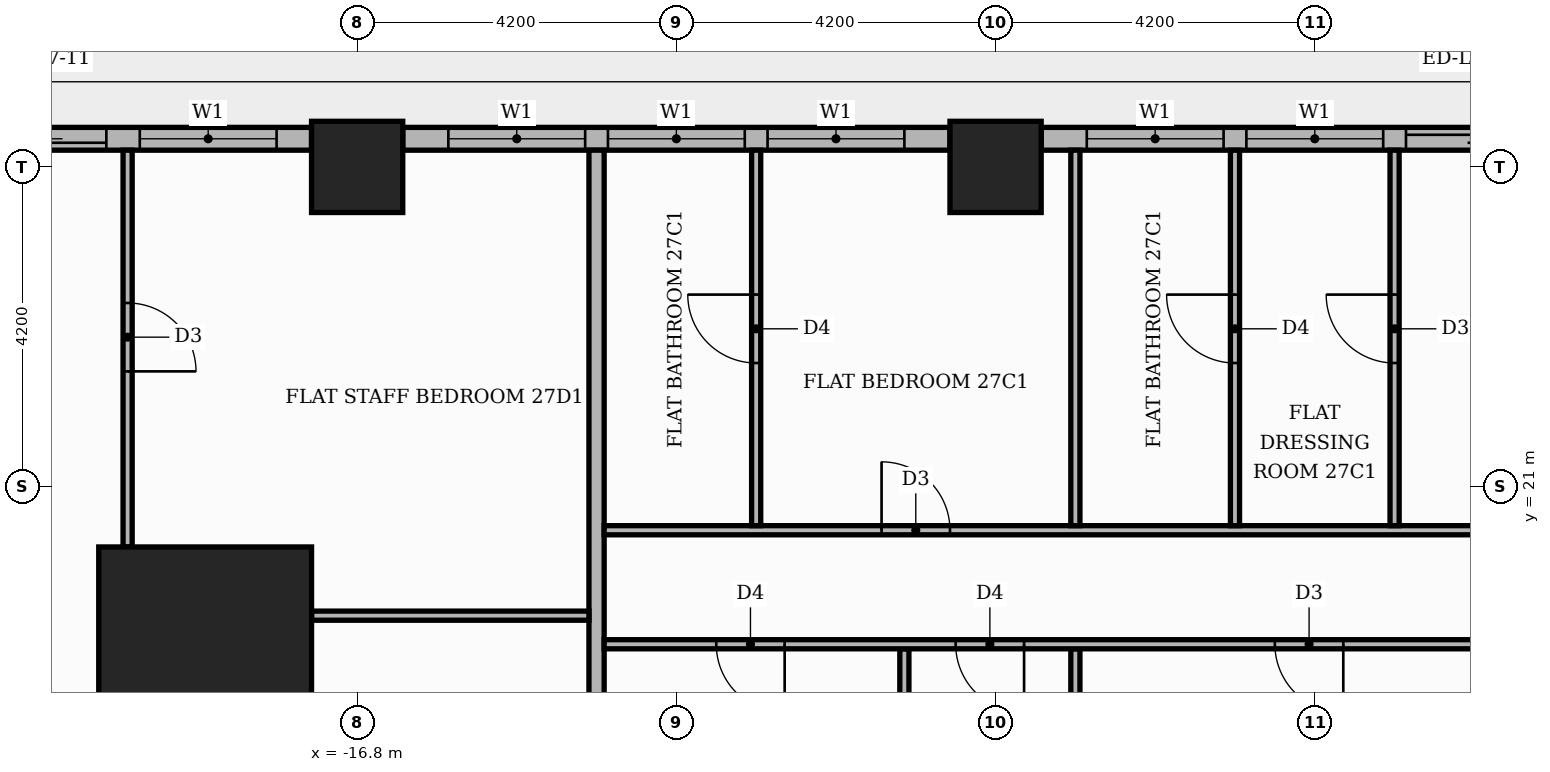
"""IFC4 building model, lengths in metres.
Left out: names, types, materials, properties, quantities, classifications, styles, units other than length and angle.
Written with IfcOpenShell. Run it as: python <this file> out.ifc"""

import sys

from ifc_helpers import new_model, si_unit, direction, frame, frame_2d, origin, origin_2d, place, context, subcontext, project, spatial, rectangle, extrude, element, fill, save


model = new_model("IFC4")
c1 = context("Model", 3, precision=1e-05, world=origin(), true_north=direction((0.0, 1.0)))
c2 = subcontext(c1, "Body", "Model", "MODEL_VIEW")
j1 = project(units=[si_unit("LENGTHUNIT", "METRE"), si_unit("PLANEANGLEUNIT", "RADIAN")], contexts=[c1])
p1 = place(None, origin())
s1 = spatial("IfcSite", under=j1, at=p1, CompositionType="ELEMENT")
p2 = place(p1, origin())
s2 = spatial("IfcBuilding", under=s1, at=p2, CompositionType="ELEMENT")
p3 = place(p2, frame((0.0, 0.0, 114.3)))
s3 = spatial("IfcBuildingStorey", under=s2, at=p3, CompositionType="ELEMENT", Elevation=114.3)
p4 = place(p3, frame((-18.8, 18.8, 0.0), z_axis=(0.0, 0.0, 1.0), x_axis=(1.0, 0.0, 0.0)))
e1 = element("IfcColumn", 1, at=p4, inside=s3, PredefinedType="COLUMN", context=c2, shape_type="SweptSolid", body=[
    extrude(rectangle(XDim=2.8, YDim=2.8, at=origin_2d()), origin(), (0.0, 0.0, 1.0), 3.9),
])
for number, where, z_axis, x_axis in (
    (2, (-8.4, 25.2, 0.0), (0.0, 0.0, 1.0), (1.0, 0.0, 0.0)),
    (3, (-16.8, 25.2, 0.0), (0.0, 0.0, 1.0), (1.0, 0.0, 0.0)),
):
    element("IfcColumn", number, at=place(p3, frame(where, z_axis=z_axis, x_axis=x_axis)), inside=s3, PredefinedType="COLUMN", context=c2, shape_type="SweptSolid", body=[
        extrude(rectangle(XDim=1.2, YDim=1.2, at=origin_2d()), origin(), (0.0, 0.0, 1.0), 3.9),
    ])
p5 = place(p3, frame((-0.6, 25.57, 0.0), z_axis=(0.0, 0.0, 1.0), x_axis=(-1.0, 0.0, 0.0)))
e4 = element("IfcWall", 4, at=p5, inside=s3, PredefinedType="STANDARD", context=c2, shape_type="SweptSolid", body=[
    extrude(rectangle(XDim=7.2, YDim=0.3, at=frame_2d((3.6, 0.0))), origin(), (0.0, 0.0, 1.0), 3.48),
])
p6 = place(p5, frame((0.6, 0.0, 0.0)))
e5 = element("IfcOpeningElement", 5, at=p6, cuts=e4, PredefinedType="OPENING", context=c2, shape_type="SweptSolid", body=[
    extrude(rectangle(XDim=1.8, YDim=2.4, at=frame_2d((0.9, 1.2))), frame((0.0, 0.16, 0.0), z_axis=(0.0, -1.0, 0.0), x_axis=(1.0, 0.0, 0.0)), (0.0, 0.0, 1.0), 0.32),
])
p7 = place(p5, frame((2.7, 0.0, 0.9)))
e6 = element("IfcOpeningElement", 6, at=p7, cuts=e4, PredefinedType="OPENING", context=c2, shape_type="SweptSolid", body=[
    extrude(rectangle(XDim=1.8, YDim=2.1, at=frame_2d((0.9, 1.05))), frame((0.0, 0.16, 0.0), z_axis=(0.0, -1.0, 0.0), x_axis=(1.0, 0.0, 0.0)), (0.0, 0.0, 1.0), 0.32),
])
p8 = place(p5, frame((4.8, 0.0, 0.9)))
e7 = element("IfcOpeningElement", 7, at=p8, cuts=e4, PredefinedType="OPENING", context=c2, shape_type="SweptSolid", body=[
    extrude(rectangle(XDim=1.8, YDim=2.1, at=frame_2d((0.9, 1.05))), frame((0.0, 0.16, 0.0), z_axis=(0.0, -1.0, 0.0), x_axis=(1.0, 0.0, 0.0)), (0.0, 0.0, 1.0), 0.32),
])
p9 = place(p3, frame((-9.0, 25.57, 0.0), z_axis=(0.0, 0.0, 1.0), x_axis=(-1.0, 0.0, 0.0)))
e8 = element("IfcWall", 8, at=p9, inside=s3, PredefinedType="STANDARD", context=c2, shape_type="SweptSolid", body=[
    extrude(rectangle(XDim=7.2, YDim=0.3, at=frame_2d((3.6, 0.0))), origin(), (0.0, 0.0, 1.0), 3.48),
])
p10 = place(p9, frame((0.6, 0.0, 0.9)))
e9 = element("IfcOpeningElement", 9, at=p10, cuts=e8, PredefinedType="OPENING", context=c2, shape_type="SweptSolid", body=[
    extrude(rectangle(XDim=1.8, YDim=2.1, at=frame_2d((0.9, 1.05))), frame((0.0, 0.16, 0.0), z_axis=(0.0, -1.0, 0.0), x_axis=(1.0, 0.0, 0.0)), (0.0, 0.0, 1.0), 0.32),
])
p11 = place(p9, frame((2.7, 0.0, 0.9)))
e10 = element("IfcOpeningElement", 10, at=p11, cuts=e8, PredefinedType="OPENING", context=c2, shape_type="SweptSolid", body=[
    extrude(rectangle(XDim=1.8, YDim=2.1, at=frame_2d((0.9, 1.05))), frame((0.0, 0.16, 0.0), z_axis=(0.0, -1.0, 0.0), x_axis=(1.0, 0.0, 0.0)), (0.0, 0.0, 1.0), 0.32),
])
p12 = place(p9, frame((4.8, 0.0, 0.9)))
e11 = element("IfcOpeningElement", 11, at=p12, cuts=e8, PredefinedType="OPENING", context=c2, shape_type="SweptSolid", body=[
    extrude(rectangle(XDim=1.8, YDim=2.1, at=frame_2d((0.9, 1.05))), frame((0.0, 0.16, 0.0), z_axis=(0.0, -1.0, 0.0), x_axis=(1.0, 0.0, 0.0)), (0.0, 0.0, 1.0), 0.32),
])
p13 = place(p3, frame((-17.4, 25.57, 0.0), z_axis=(0.0, 0.0, 1.0), x_axis=(-1.0, 0.0, 0.0)))
e12 = element("IfcWall", 12, at=p13, inside=s3, PredefinedType="STANDARD", context=c2, shape_type="SweptSolid", body=[
    extrude(rectangle(XDim=4.82, YDim=0.3, at=frame_2d((2.41, 0.0))), origin(), (0.0, 0.0, 1.0), 3.48),
])
p14 = place(p13, frame((2.7, 0.0, 0.0)))
e13 = element("IfcOpeningElement", 13, at=p14, cuts=e12, PredefinedType="OPENING", context=c2, shape_type="SweptSolid", body=[
    extrude(rectangle(XDim=1.8, YDim=2.4, at=frame_2d((0.9, 1.2))), frame((0.0, 0.16, 0.0), z_axis=(0.0, -1.0, 0.0), x_axis=(1.0, 0.0, 0.0)), (0.0, 0.0, 1.0), 0.32),
])
p15 = place(p13, frame((0.46, 0.0, 0.9)))
e14 = element("IfcOpeningElement", 14, at=p15, cuts=e12, PredefinedType="OPENING", context=c2, shape_type="SweptSolid", body=[
    extrude(rectangle(XDim=1.8, YDim=2.1, at=frame_2d((0.9, 1.05))), frame((0.0, 0.16, 0.0), z_axis=(0.0, -1.0, 0.0), x_axis=(1.0, 0.0, 0.0)), (0.0, 0.0, 1.0), 0.32),
])
p16 = place(p3, frame((-13.65, 13.75, 0.0), z_axis=(0.0, 0.0, 1.0), x_axis=(0.0, 1.0, 0.0)))
e15 = element("IfcWall", 15, at=p16, inside=s3, PredefinedType="PARTITIONING", context=c2, shape_type="SweptSolid", body=[
    extrude(rectangle(XDim=11.67, YDim=0.2, at=frame_2d((5.835, 0.0))), origin(), (0.0, 0.0, 1.0), 3.48),
])
for number, where, z_axis, x_axis in (
    (16, (-9.6, 13.75, 0.0), (0.0, 0.0, 1.0), (0.0, 1.0, 0.0)),
    (17, (-7.35, 13.75, 0.0), (0.0, 0.0, 1.0), (0.0, 1.0, 0.0)),
):
    element("IfcWall", number, at=place(p3, frame(where, z_axis=z_axis, x_axis=x_axis)), inside=s3, PredefinedType="PARTITIONING", context=c2, shape_type="SweptSolid", body=[
        extrude(rectangle(XDim=5.11, YDim=0.12, at=frame_2d((2.555, 0.0))), origin(), (0.0, 0.0, 1.0), 3.48),
    ])
p17 = place(p3, frame((-13.55, 18.92, 0.0), z_axis=(0.0, 0.0, 1.0), x_axis=(1.0, 0.0, 0.0)))
e18 = element("IfcWall", 18, at=p17, inside=s3, PredefinedType="PARTITIONING", context=c2, shape_type="SweptSolid", body=[
    extrude(rectangle(XDim=23.0, YDim=0.12, at=frame_2d((11.5, 0.0))), origin(), (0.0, 0.0, 1.0), 3.48),
])
p18 = place(p17, frame((19.7, 0.0, 0.0)))
e19 = element("IfcOpeningElement", 19, at=p18, cuts=e18, PredefinedType="OPENING", context=c2, shape_type="SweptSolid", body=[
    extrude(rectangle(XDim=0.9, YDim=2.1, at=frame_2d((0.45, 1.05))), frame((0.0, 0.07, 0.0), z_axis=(0.0, -1.0, 0.0), x_axis=(1.0, 0.0, 0.0)), (0.0, 0.0, 1.0), 0.14),
])
p19 = place(p17, frame((14.375, 0.0, 0.0)))
e20 = element("IfcOpeningElement", 20, at=p19, cuts=e18, PredefinedType="OPENING", context=c2, shape_type="SweptSolid", body=[
    extrude(rectangle(XDim=0.9, YDim=2.1, at=frame_2d((0.45, 1.05))), frame((0.0, 0.07, 0.0), z_axis=(0.0, -1.0, 0.0), x_axis=(1.0, 0.0, 0.0)), (0.0, 0.0, 1.0), 0.14),
])
p20 = place(p17, frame((8.825, 0.0, 0.0)))
e21 = element("IfcOpeningElement", 21, at=p20, cuts=e18, PredefinedType="OPENING", context=c2, shape_type="SweptSolid", body=[
    extrude(rectangle(XDim=0.9, YDim=2.1, at=frame_2d((0.45, 1.05))), frame((0.0, 0.07, 0.0), z_axis=(0.0, -1.0, 0.0), x_axis=(1.0, 0.0, 0.0)), (0.0, 0.0, 1.0), 0.14),
])
p21 = place(p17, frame((4.625, 0.0, 0.0)))
e22 = element("IfcOpeningElement", 22, at=p21, cuts=e18, PredefinedType="OPENING", context=c2, shape_type="SweptSolid", body=[
    extrude(rectangle(XDim=0.9, YDim=2.1, at=frame_2d((0.45, 1.05))), frame((0.0, 0.07, 0.0), z_axis=(0.0, -1.0, 0.0), x_axis=(1.0, 0.0, 0.0)), (0.0, 0.0, 1.0), 0.14),
])
p22 = place(p17, frame((1.475, 0.0, 0.0)))
e23 = element("IfcOpeningElement", 23, at=p22, cuts=e18, PredefinedType="OPENING", context=c2, shape_type="SweptSolid", body=[
    extrude(rectangle(XDim=0.9, YDim=2.1, at=frame_2d((0.45, 1.05))), frame((0.0, 0.07, 0.0), z_axis=(0.0, -1.0, 0.0), x_axis=(1.0, 0.0, 0.0)), (0.0, 0.0, 1.0), 0.14),
])
p23 = place(p3, frame((-17.4, 19.296, 0.0), z_axis=(0.0, 0.0, 1.0), x_axis=(1.0, 0.0, 0.0)))
e24 = element("IfcWall", 24, at=p23, inside=s3, PredefinedType="PARTITIONING", context=c2, shape_type="SweptSolid", body=[
    extrude(rectangle(XDim=3.65, YDim=0.12, at=frame_2d((1.825, 0.0))), origin(), (0.0, 0.0, 1.0), 3.48),
])
p24 = place(p3, frame((-19.82, 20.2, 0.0), z_axis=(0.0, 0.0, 1.0), x_axis=(0.0, 1.0, 0.0)))
e25 = element("IfcWall", 25, at=p24, inside=s3, PredefinedType="PARTITIONING", context=c2, shape_type="SweptSolid", body=[
    extrude(rectangle(XDim=5.22, YDim=0.12, at=frame_2d((2.61, 0.0))), origin(), (0.0, 0.0, 1.0), 3.48),
])
p25 = place(p24, frame((2.31, 0.0, 0.0)))
e26 = element("IfcOpeningElement", 26, at=p25, cuts=e25, PredefinedType="OPENING", context=c2, shape_type="SweptSolid", body=[
    extrude(rectangle(XDim=0.9, YDim=2.1, at=frame_2d((0.45, 1.05))), frame((0.0, 0.07, 0.0), z_axis=(0.0, -1.0, 0.0), x_axis=(1.0, 0.0, 0.0)), (0.0, 0.0, 1.0), 0.14),
])
p26 = place(p3, frame((-13.55, 20.42, 0.0), z_axis=(0.0, 0.0, 1.0), x_axis=(1.0, 0.0, 0.0)))
e27 = element("IfcWall", 27, at=p26, inside=s3, PredefinedType="PARTITIONING", context=c2, shape_type="SweptSolid", body=[
    extrude(rectangle(XDim=38.97, YDim=0.12, at=frame_2d((19.485, 0.0))), origin(), (0.0, 0.0, 1.0), 3.48),
])
p27 = place(p26, frame((27.75, 0.0, 0.0)))
e28 = element("IfcOpeningElement", 28, at=p27, cuts=e27, PredefinedType="OPENING", context=c2, shape_type="SweptSolid", body=[
    extrude(rectangle(XDim=1.0, YDim=2.1, at=frame_2d((0.5, 1.05))), frame((0.0, 0.07, 0.0), z_axis=(0.0, -1.0, 0.0), x_axis=(1.0, 0.0, 0.0)), (0.0, 0.0, 1.0), 0.14),
])
p28 = place(p26, frame((22.5, 0.0, 0.0)))
e29 = element("IfcOpeningElement", 29, at=p28, cuts=e27, PredefinedType="OPENING", context=c2, shape_type="SweptSolid", body=[
    extrude(rectangle(XDim=1.0, YDim=2.1, at=frame_2d((0.5, 1.05))), frame((0.0, 0.07, 0.0), z_axis=(0.0, -1.0, 0.0), x_axis=(1.0, 0.0, 0.0)), (0.0, 0.0, 1.0), 0.14),
])
p29 = place(p26, frame((14.15, 0.0, 0.0)))
e30 = element("IfcOpeningElement", 30, at=p29, cuts=e27, PredefinedType="OPENING", context=c2, shape_type="SweptSolid", body=[
    extrude(rectangle(XDim=0.9, YDim=2.1, at=frame_2d((0.45, 1.05))), frame((0.0, 0.07, 0.0), z_axis=(0.0, -1.0, 0.0), x_axis=(1.0, 0.0, 0.0)), (0.0, 0.0, 1.0), 0.14),
])
p30 = place(p26, frame((3.65, 0.0, 0.0)))
e31 = element("IfcOpeningElement", 31, at=p30, cuts=e27, PredefinedType="OPENING", context=c2, shape_type="SweptSolid", body=[
    extrude(rectangle(XDim=0.9, YDim=2.1, at=frame_2d((0.45, 1.05))), frame((0.0, 0.07, 0.0), z_axis=(0.0, -1.0, 0.0), x_axis=(1.0, 0.0, 0.0)), (0.0, 0.0, 1.0), 0.14),
])
p31 = place(p3, frame((-11.55, 20.48, 0.0), z_axis=(0.0, 0.0, 1.0), x_axis=(0.0, 1.0, 0.0)))
e32 = element("IfcWall", 32, at=p31, inside=s3, PredefinedType="PARTITIONING", context=c2, shape_type="SweptSolid", body=[
    extrude(rectangle(XDim=4.94, YDim=0.12, at=frame_2d((2.47, 0.0))), origin(), (0.0, 0.0, 1.0), 3.48),
])
p32 = place(p31, frame((2.14, 0.0, 0.0)))
e33 = element("IfcOpeningElement", 33, at=p32, cuts=e32, PredefinedType="OPENING", context=c2, shape_type="SweptSolid", body=[
    extrude(rectangle(XDim=0.9, YDim=2.1, at=frame_2d((0.45, 1.05))), frame((0.0, 0.07, 0.0), z_axis=(0.0, -1.0, 0.0), x_axis=(1.0, 0.0, 0.0)), (0.0, 0.0, 1.0), 0.14),
])
p33 = place(p3, frame((-7.35, 20.48, 0.0), z_axis=(0.0, 0.0, 1.0), x_axis=(0.0, 1.0, 0.0)))
e34 = element("IfcWall", 34, at=p33, inside=s3, PredefinedType="PARTITIONING", context=c2, shape_type="SweptSolid", body=[
    extrude(rectangle(XDim=4.94, YDim=0.12, at=frame_2d((2.47, 0.0))), origin(), (0.0, 0.0, 1.0), 3.48),
])
p34 = place(p3, frame((-5.25, 20.48, 0.0), z_axis=(0.0, 0.0, 1.0), x_axis=(0.0, 1.0, 0.0)))
e35 = element("IfcWall", 35, at=p34, inside=s3, PredefinedType="PARTITIONING", context=c2, shape_type="SweptSolid", body=[
    extrude(rectangle(XDim=4.94, YDim=0.12, at=frame_2d((2.47, 0.0))), origin(), (0.0, 0.0, 1.0), 3.48),
])
p35 = place(p34, frame((2.14, 0.0, 0.0)))
e36 = element("IfcOpeningElement", 36, at=p35, cuts=e35, PredefinedType="OPENING", context=c2, shape_type="SweptSolid", body=[
    extrude(rectangle(XDim=0.9, YDim=2.1, at=frame_2d((0.45, 1.05))), frame((0.0, 0.07, 0.0), z_axis=(0.0, -1.0, 0.0), x_axis=(1.0, 0.0, 0.0)), (0.0, 0.0, 1.0), 0.14),
])
p36 = place(p3, frame((-3.15, 20.48, 0.0), z_axis=(0.0, 0.0, 1.0), x_axis=(0.0, 1.0, 0.0)))
e37 = element("IfcWall", 37, at=p36, inside=s3, PredefinedType="PARTITIONING", context=c2, shape_type="SweptSolid", body=[
    extrude(rectangle(XDim=4.94, YDim=0.12, at=frame_2d((2.47, 0.0))), origin(), (0.0, 0.0, 1.0), 3.48),
])
p37 = place(p36, frame((2.14, 0.0, 0.0)))
e38 = element("IfcOpeningElement", 38, at=p37, cuts=e37, PredefinedType="OPENING", context=c2, shape_type="SweptSolid", body=[
    extrude(rectangle(XDim=0.9, YDim=2.1, at=frame_2d((0.45, 1.05))), frame((0.0, 0.07, 0.0), z_axis=(0.0, -1.0, 0.0), x_axis=(1.0, 0.0, 0.0)), (0.0, 0.0, 1.0), 0.14),
])
p38 = place(p6, origin())
e39 = element("IfcDoor", 39, at=p38, inside=s3, OperationType="SLIDING_TO_LEFT", PredefinedType="DOOR", context=c2, shape_type="SweptSolid", body=[
    extrude(rectangle(XDim=1.8, YDim=2.4, at=frame_2d((0.9, 1.2))), frame((0.0, 0.025, 0.0), z_axis=(0.0, -1.0, 0.0), x_axis=(1.0, 0.0, 0.0)), (0.0, 0.0, 1.0), 0.05),
])
fill(e5, e39)
p39 = place(p7, origin())
e40 = element("IfcWindow", 40, at=p39, inside=s3, PartitioningType="SINGLE_PANEL", PredefinedType="WINDOW", context=c2, shape_type="SweptSolid", body=[
    extrude(rectangle(XDim=1.8, YDim=2.1, at=frame_2d((0.9, 1.05))), frame((0.0, 0.03, 0.0), z_axis=(0.0, -1.0, 0.0), x_axis=(1.0, 0.0, 0.0)), (0.0, 0.0, 1.0), 0.06),
])
fill(e6, e40)
p40 = place(p8, origin())
e41 = element("IfcWindow", 41, at=p40, inside=s3, PartitioningType="SINGLE_PANEL", PredefinedType="WINDOW", context=c2, shape_type="SweptSolid", body=[
    extrude(rectangle(XDim=1.8, YDim=2.1, at=frame_2d((0.9, 1.05))), frame((0.0, 0.03, 0.0), z_axis=(0.0, -1.0, 0.0), x_axis=(1.0, 0.0, 0.0)), (0.0, 0.0, 1.0), 0.06),
])
fill(e7, e41)
p41 = place(p10, origin())
e42 = element("IfcWindow", 42, at=p41, inside=s3, PartitioningType="SINGLE_PANEL", PredefinedType="WINDOW", context=c2, shape_type="SweptSolid", body=[
    extrude(rectangle(XDim=1.8, YDim=2.1, at=frame_2d((0.9, 1.05))), frame((0.0, 0.03, 0.0), z_axis=(0.0, -1.0, 0.0), x_axis=(1.0, 0.0, 0.0)), (0.0, 0.0, 1.0), 0.06),
])
fill(e9, e42)
p42 = place(p11, origin())
e43 = element("IfcWindow", 43, at=p42, inside=s3, PartitioningType="SINGLE_PANEL", PredefinedType="WINDOW", context=c2, shape_type="SweptSolid", body=[
    extrude(rectangle(XDim=1.8, YDim=2.1, at=frame_2d((0.9, 1.05))), frame((0.0, 0.03, 0.0), z_axis=(0.0, -1.0, 0.0), x_axis=(1.0, 0.0, 0.0)), (0.0, 0.0, 1.0), 0.06),
])
fill(e10, e43)
p43 = place(p12, origin())
e44 = element("IfcWindow", 44, at=p43, inside=s3, PartitioningType="SINGLE_PANEL", PredefinedType="WINDOW", context=c2, shape_type="SweptSolid", body=[
    extrude(rectangle(XDim=1.8, YDim=2.1, at=frame_2d((0.9, 1.05))), frame((0.0, 0.03, 0.0), z_axis=(0.0, -1.0, 0.0), x_axis=(1.0, 0.0, 0.0)), (0.0, 0.0, 1.0), 0.06),
])
fill(e11, e44)
p44 = place(p14, origin())
e45 = element("IfcDoor", 45, at=p44, inside=s3, OperationType="SLIDING_TO_LEFT", PredefinedType="DOOR", context=c2, shape_type="SweptSolid", body=[
    extrude(rectangle(XDim=1.8, YDim=2.4, at=frame_2d((0.9, 1.2))), frame((0.0, 0.025, 0.0), z_axis=(0.0, -1.0, 0.0), x_axis=(1.0, 0.0, 0.0)), (0.0, 0.0, 1.0), 0.05),
])
fill(e13, e45)
p45 = place(p15, origin())
e46 = element("IfcWindow", 46, at=p45, inside=s3, PartitioningType="SINGLE_PANEL", PredefinedType="WINDOW", context=c2, shape_type="SweptSolid", body=[
    extrude(rectangle(XDim=1.8, YDim=2.1, at=frame_2d((0.9, 1.05))), frame((0.0, 0.03, 0.0), z_axis=(0.0, -1.0, 0.0), x_axis=(1.0, 0.0, 0.0)), (0.0, 0.0, 1.0), 0.06),
])
fill(e14, e46)
p46 = place(p20, frame((0.9, 0.0, 0.0), z_axis=(0.0, 0.0, 1.0), x_axis=(-1.0, 0.0, 0.0)))
e47 = element("IfcDoor", 47, at=p46, inside=s3, OperationType="SINGLE_SWING_RIGHT", PredefinedType="DOOR", context=c2, shape_type="SweptSolid", body=[
    extrude(rectangle(XDim=0.9, YDim=2.1, at=frame_2d((0.45, 1.05))), frame((0.0, 0.025, 0.0), z_axis=(0.0, -1.0, 0.0), x_axis=(1.0, 0.0, 0.0)), (0.0, 0.0, 1.0), 0.05),
])
fill(e21, e47)
p47 = place(p21, frame((0.9, 0.0, 0.0), z_axis=(0.0, 0.0, 1.0), x_axis=(-1.0, 0.0, 0.0)))
e48 = element("IfcDoor", 48, at=p47, inside=s3, OperationType="SINGLE_SWING_RIGHT", PredefinedType="DOOR", context=c2, shape_type="SweptSolid", body=[
    extrude(rectangle(XDim=0.9, YDim=2.1, at=frame_2d((0.45, 1.05))), frame((0.0, 0.025, 0.0), z_axis=(0.0, -1.0, 0.0), x_axis=(1.0, 0.0, 0.0)), (0.0, 0.0, 1.0), 0.05),
])
fill(e22, e48)
p48 = place(p22, frame((0.9, 0.0, 0.0), z_axis=(0.0, 0.0, 1.0), x_axis=(-1.0, 0.0, 0.0)))
e49 = element("IfcDoor", 49, at=p48, inside=s3, OperationType="SINGLE_SWING_RIGHT", PredefinedType="DOOR", context=c2, shape_type="SweptSolid", body=[
    extrude(rectangle(XDim=0.9, YDim=2.1, at=frame_2d((0.45, 1.05))), frame((0.0, 0.025, 0.0), z_axis=(0.0, -1.0, 0.0), x_axis=(1.0, 0.0, 0.0)), (0.0, 0.0, 1.0), 0.05),
])
fill(e23, e49)
p49 = place(p37, origin())
e50 = element("IfcDoor", 50, at=p49, inside=s3, OperationType="SINGLE_SWING_RIGHT", PredefinedType="DOOR", context=c2, shape_type="SweptSolid", body=[
    extrude(rectangle(XDim=0.9, YDim=2.1, at=frame_2d((0.45, 1.05))), frame((0.0, 0.025, 0.0), z_axis=(0.0, -1.0, 0.0), x_axis=(1.0, 0.0, 0.0)), (0.0, 0.0, 1.0), 0.05),
])
fill(e38, e50)
p50 = place(p35, origin())
e51 = element("IfcDoor", 51, at=p50, inside=s3, OperationType="SINGLE_SWING_RIGHT", PredefinedType="DOOR", context=c2, shape_type="SweptSolid", body=[
    extrude(rectangle(XDim=0.9, YDim=2.1, at=frame_2d((0.45, 1.05))), frame((0.0, 0.025, 0.0), z_axis=(0.0, -1.0, 0.0), x_axis=(1.0, 0.0, 0.0)), (0.0, 0.0, 1.0), 0.05),
])
fill(e36, e51)
p51 = place(p30, origin())
e52 = element("IfcDoor", 52, at=p51, inside=s3, OperationType="SINGLE_SWING_LEFT", PredefinedType="DOOR", context=c2, shape_type="SweptSolid", body=[
    extrude(rectangle(XDim=0.9, YDim=2.1, at=frame_2d((0.45, 1.05))), frame((0.0, 0.025, 0.0), z_axis=(0.0, -1.0, 0.0), x_axis=(1.0, 0.0, 0.0)), (0.0, 0.0, 1.0), 0.05),
])
fill(e31, e52)
p52 = place(p32, origin())
e53 = element("IfcDoor", 53, at=p52, inside=s3, OperationType="SINGLE_SWING_RIGHT", PredefinedType="DOOR", context=c2, shape_type="SweptSolid", body=[
    extrude(rectangle(XDim=0.9, YDim=2.1, at=frame_2d((0.45, 1.05))), frame((0.0, 0.025, 0.0), z_axis=(0.0, -1.0, 0.0), x_axis=(1.0, 0.0, 0.0)), (0.0, 0.0, 1.0), 0.05),
])
fill(e33, e53)
p53 = place(p25, frame((0.9, 0.0, 0.0), z_axis=(0.0, 0.0, 1.0), x_axis=(-1.0, 0.0, 0.0)))
e54 = element("IfcDoor", 54, at=p53, inside=s3, OperationType="SINGLE_SWING_LEFT", PredefinedType="DOOR", context=c2, shape_type="SweptSolid", body=[
    extrude(rectangle(XDim=0.9, YDim=2.1, at=frame_2d((0.45, 1.05))), frame((0.0, 0.025, 0.0), z_axis=(0.0, -1.0, 0.0), x_axis=(1.0, 0.0, 0.0)), (0.0, 0.0, 1.0), 0.05),
])
fill(e26, e54)
save(model, sys.argv[1])
